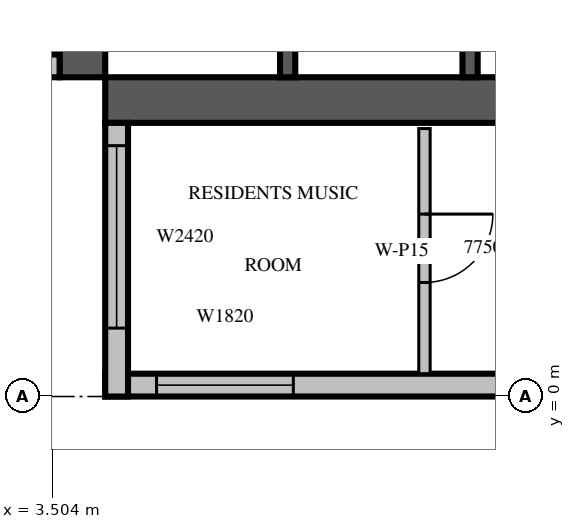
"""IFC4 building model, lengths in metres.
Left out: names, types, materials, properties, quantities, classifications, styles, units other than length and angle.
Written with IfcOpenShell. Run it as: python <this file> out.ifc"""

import sys

from ifc_helpers import new_model, si_unit, direction, frame, frame_2d, origin, place, context, subcontext, project, spatial, rectangle, extrude, source, transform, mapped, element, fill, save


model = new_model("IFC4")
c1 = context("Model", 3, precision=1e-05, world=origin(), true_north=direction((0.0, 1.0)))
c2 = subcontext(c1, "Body", "Model", "MODEL_VIEW")
j1 = project(units=[si_unit("LENGTHUNIT", "METRE"), si_unit("PLANEANGLEUNIT", "RADIAN")], contexts=[c1])
p1 = place(None, origin())
s1 = spatial("IfcSite", under=j1, at=p1, CompositionType="ELEMENT")
p2 = place(p1, origin())
s2 = spatial("IfcBuilding", under=s1, at=p2, CompositionType="ELEMENT")
p3 = place(p2, frame((0.0, 0.0, 323.0)))
s3 = spatial("IfcBuildingStorey", under=s2, at=p3, CompositionType="ELEMENT", Elevation=323.0)
m1 = source(origin(), c2, "Body", "SweptSolid", [
    extrude(rectangle(XDim=17.4, YDim=0.6, at=frame_2d((8.7, 0.0))), origin(), (0.0, 0.0, 1.0), 3.5),
])
p4 = place(p3, frame((3.9, 4.2, 0.0), z_axis=(0.0, 0.0, 1.0), x_axis=(0.0, 1.0, 0.0)))
e1 = element("IfcWall", 1, at=p4, inside=s3, PredefinedType="SHEAR", context=c2, shape_type="MappedRepresentation", body=[
    mapped(m1, transform((0.0, 0.0, 0.0), scale=1.0)),
])
m2 = source(origin(), c2, "Body", "SweptSolid", [
    extrude(rectangle(XDim=2.2, YDim=2.1, at=frame_2d((1.1, 1.05))), frame((0.0, 0.31, 0.0), z_axis=(0.0, -1.0, 0.0), x_axis=(1.0, 0.0, 0.0)), (0.0, 0.0, 1.0), 0.62),
])
p5 = place(p4, frame((4.2, 0.0, 0.0)))
e2 = element("IfcOpeningElement", 2, at=p5, cuts=e1, PredefinedType="OPENING", context=c2, shape_type="MappedRepresentation", body=[
    mapped(m2, transform((0.0, 0.0, 0.0), scale=1.0)),
])
p6 = place(p3, frame((4.2, 3.9, 0.0), z_axis=(0.0, 0.0, 1.0), x_axis=(1.0, 0.0, 0.0)))
e3 = element("IfcWall", 3, at=p6, inside=s3, PredefinedType="SHEAR", context=c2, shape_type="MappedRepresentation", body=[
    mapped(m1, transform((0.0, 0.0, 0.0), scale=1.0)),
])
m3 = source(origin(), c2, "Body", "SweptSolid", [
    extrude(rectangle(XDim=0.9, YDim=2.1, at=frame_2d((0.45, 1.05))), frame((0.0, 0.31, 0.0), z_axis=(0.0, -1.0, 0.0), x_axis=(1.0, 0.0, 0.0)), (0.0, 0.0, 1.0), 0.62),
])
p7 = place(p6, frame((15.2, 0.0, 0.0)))
e4 = element("IfcOpeningElement", 4, at=p7, cuts=e3, PredefinedType="OPENING", context=c2, shape_type="MappedRepresentation", body=[
    mapped(m3, transform((0.0, 0.0, 0.0), scale=1.0)),
])
m4 = source(origin(), c2, "Body", "SweptSolid", [
    extrude(rectangle(XDim=5.95, YDim=0.3, at=frame_2d((2.975, 0.0))), origin(), (0.0, 0.0, 1.0), 3.1),
])
p8 = place(p3, frame((4.2, 0.15, 0.0), z_axis=(0.0, 0.0, 1.0), x_axis=(1.0, 0.0, 0.0)))
e5 = element("IfcWall", 5, at=p8, inside=s3, PredefinedType="STANDARD", context=c2, shape_type="MappedRepresentation", body=[
    mapped(m4, transform((0.0, 0.0, 0.0), scale=1.0)),
])
m5 = source(origin(), c2, "Body", "SweptSolid", [
    extrude(rectangle(XDim=1.8, YDim=2.0, at=frame_2d((0.9, 1.0))), frame((0.0, 0.16, 0.0), z_axis=(0.0, -1.0, 0.0), x_axis=(1.0, 0.0, 0.0)), (0.0, 0.0, 1.0), 0.32),
])
p9 = place(p8, frame((0.675, 0.0, 0.6)))
e6 = element("IfcOpeningElement", 6, at=p9, cuts=e5, PredefinedType="OPENING", context=c2, shape_type="MappedRepresentation", body=[
    mapped(m5, transform((0.0, 0.0, 0.0), scale=1.0)),
])
m6 = source(origin(), c2, "Body", "SweptSolid", [
    extrude(rectangle(XDim=3.6, YDim=0.3, at=frame_2d((1.8, 0.0))), origin(), (0.0, 0.0, 1.0), 3.1),
])
p10 = place(p3, frame((0.0, 4.35, 0.0), z_axis=(0.0, 0.0, 1.0), x_axis=(1.0, 0.0, 0.0)))
e7 = element("IfcWall", 7, at=p10, inside=s3, PredefinedType="STANDARD", context=c2, shape_type="MappedRepresentation", body=[
    mapped(m6, transform((0.0, 0.0, 0.0), scale=1.0)),
])
m7 = source(origin(), c2, "Body", "SweptSolid", [
    extrude(rectangle(XDim=2.4, YDim=2.0, at=frame_2d((1.2, 1.0))), frame((0.0, 0.16, 0.0), z_axis=(0.0, -1.0, 0.0), x_axis=(1.0, 0.0, 0.0)), (0.0, 0.0, 1.0), 0.32),
])
p11 = place(p10, frame((0.9, 0.0, 0.6)))
e8 = element("IfcOpeningElement", 8, at=p11, cuts=e7, PredefinedType="OPENING", context=c2, shape_type="MappedRepresentation", body=[
    mapped(m7, transform((0.0, 0.0, 0.0), scale=1.0)),
])
p12 = place(p3, frame((4.35, 3.6, 0.0), z_axis=(0.0, 0.0, 1.0), x_axis=(0.0, -1.0, 0.0)))
e9 = element("IfcWall", 9, at=p12, inside=s3, PredefinedType="STANDARD", context=c2, shape_type="MappedRepresentation", body=[
    mapped(m6, transform((0.0, 0.0, 0.0), scale=1.0)),
])
p13 = place(p12, frame((0.3, 0.0, 0.6)))
e10 = element("IfcOpeningElement", 10, at=p13, cuts=e9, PredefinedType="OPENING", context=c2, shape_type="MappedRepresentation", body=[
    mapped(m7, transform((0.0, 0.0, 0.0), scale=1.0)),
])
m8 = source(origin(), c2, "Body", "SweptSolid", [
    extrude(rectangle(XDim=3.1, YDim=0.2, at=frame_2d((1.55, 0.0))), origin(), (0.0, 0.0, 1.0), 3.5),
])
for number, where, z_axis, x_axis in (
    (11, (6.6, 4.2, 0.0), (0.0, 0.0, 1.0), (0.0, 1.0, 0.0)),
    (12, (9.0, 4.2, 0.0), (0.0, 0.0, 1.0), (0.0, 1.0, 0.0)),
):
    element("IfcWall", number, at=place(p3, frame(where, z_axis=z_axis, x_axis=x_axis)), inside=s3, PredefinedType="SOLIDWALL", context=c2, shape_type="MappedRepresentation", body=[
        mapped(m8, transform((0.0, 0.0, 0.0), scale=1.0)),
    ])
m9 = source(origin(), c2, "Body", "SweptSolid", [
    extrude(rectangle(XDim=3.225, YDim=0.15, at=frame_2d((1.613, 0.0))), origin(), (0.0, 0.0, 1.0), 3.1),
])
p14 = place(p3, frame((8.4, 3.525, 0.0), z_axis=(0.0, 0.0, 1.0), x_axis=(0.0, -1.0, 0.0)))
e13 = element("IfcWall", 13, at=p14, inside=s3, PredefinedType="PARTITIONING", context=c2, shape_type="MappedRepresentation", body=[
    mapped(m9, transform((0.0, 0.0, 0.0), scale=1.0)),
])
m10 = source(origin(), c2, "Body", "SweptSolid", [
    extrude(rectangle(XDim=0.9, YDim=2.1, at=frame_2d((0.45, 1.05))), frame((0.0, 0.085, 0.0), z_axis=(0.0, -1.0, 0.0), x_axis=(1.0, 0.0, 0.0)), (0.0, 0.0, 1.0), 0.17),
])
p15 = place(p14, frame((1.125, 0.0, 0.0)))
e14 = element("IfcOpeningElement", 14, at=p15, cuts=e13, PredefinedType="OPENING", context=c2, shape_type="MappedRepresentation", body=[
    mapped(m10, transform((0.0, 0.0, 0.0), scale=1.0)),
])
m11 = source(origin(), c2, "Body", "SweptSolid", [
    extrude(rectangle(XDim=1.8, YDim=2.0, at=frame_2d((0.9, 1.0))), frame((0.0, 0.03, 0.0), z_axis=(0.0, -1.0, 0.0), x_axis=(1.0, 0.0, 0.0)), (0.0, 0.0, 1.0), 0.06),
])
p16 = place(p9, origin())
e15 = element("IfcWindow", 15, at=p16, inside=s3, PartitioningType="SINGLE_PANEL", PredefinedType="WINDOW", context=c2, shape_type="MappedRepresentation", body=[
    mapped(m11, transform((0.0, 0.0, 0.0), scale=1.0)),
])
fill(e6, e15)
m12 = source(origin(), c2, "Body", "SweptSolid", [
    extrude(rectangle(XDim=2.4, YDim=2.0, at=frame_2d((1.2, 1.0))), frame((0.0, 0.03, 0.0), z_axis=(0.0, -1.0, 0.0), x_axis=(1.0, 0.0, 0.0)), (0.0, 0.0, 1.0), 0.06),
])
p17 = place(p13, origin())
e16 = element("IfcWindow", 16, at=p17, inside=s3, PartitioningType="SINGLE_PANEL", PredefinedType="WINDOW", context=c2, shape_type="MappedRepresentation", body=[
    mapped(m12, transform((0.0, 0.0, 0.0), scale=1.0)),
])
fill(e10, e16)
m13 = source(origin(), c2, "Body", "SweptSolid", [
    extrude(rectangle(XDim=0.9, YDim=2.1, at=frame_2d((0.45, 1.05))), frame((0.0, 0.025, 0.0), z_axis=(0.0, -1.0, 0.0), x_axis=(1.0, 0.0, 0.0)), (0.0, 0.0, 1.0), 0.05),
])
p18 = place(p15, origin())
e17 = element("IfcDoor", 17, at=p18, inside=s3, OperationType="SINGLE_SWING_LEFT", PredefinedType="DOOR", context=c2, shape_type="MappedRepresentation", body=[
    mapped(m13, transform((0.0, 0.0, 0.0), scale=1.0)),
])
fill(e14, e17)
save(model, sys.argv[1])
